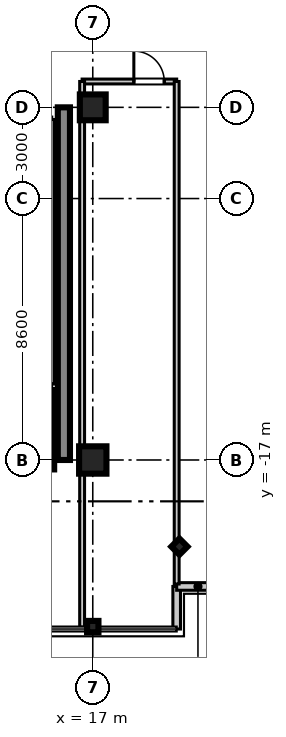
"""IFC4 building model, lengths in metres.
Left out: names, types, materials, properties, quantities, classifications, styles, units other than length and angle.
Written with IfcOpenShell. Run it as: python <this file> out.ifc"""

import sys

from ifc_helpers import new_model, si_unit, direction, frame, frame_2d, origin, origin_2d, place, context, subcontext, project, spatial, rectangle, i_section, extrude, source, transform, mapped, element, fill, save


model = new_model("IFC4")
c1 = context("Model", 3, precision=1e-05, world=origin(), true_north=direction((0.0, 1.0)))
c2 = subcontext(c1, "Body", "Model", "MODEL_VIEW")
j1 = project(units=[si_unit("LENGTHUNIT", "METRE"), si_unit("PLANEANGLEUNIT", "RADIAN")], contexts=[c1])
p1 = place(None, origin())
s1 = spatial("IfcSite", under=j1, at=p1, CompositionType="ELEMENT")
p2 = place(p1, origin())
s2 = spatial("IfcBuilding", under=s1, at=p2, CompositionType="ELEMENT")
p3 = place(p2, frame((0.0, 0.0, 273.8)))
s3 = spatial("IfcBuildingStorey", under=s2, at=p3, CompositionType="ELEMENT", Elevation=273.8)
m1 = source(origin(), c2, "Body", "SweptSolid", [
    extrude(rectangle(XDim=0.9, YDim=0.9, at=origin_2d()), origin(), (0.0, 0.0, 1.0), 3.705),
])
p4 = place(p3, frame((17.0, -17.0, 0.0), z_axis=(0.0, 0.0, 1.0), x_axis=(1.0, 0.0, 0.0)))
e1 = element("IfcColumn", 1, at=p4, inside=s3, PredefinedType="COLUMN", context=c2, shape_type="MappedRepresentation", body=[
    mapped(m1, transform((0.0, 0.0, 0.0), scale=1.0)),
])
m2 = source(origin(), c2, "Body", "SweptSolid", [
    extrude(rectangle(XDim=0.85, YDim=0.85, at=origin_2d()), origin(), (0.0, 0.0, 1.0), 3.705),
])
p5 = place(p3, frame((17.0, -5.4, 0.0), z_axis=(0.0, 0.0, 1.0), x_axis=(1.0, 0.0, 0.0)))
e2 = element("IfcColumn", 2, at=p5, inside=s3, PredefinedType="PILASTER", context=c2, shape_type="MappedRepresentation", body=[
    mapped(m2, transform((0.0, 0.0, 0.0), scale=1.0)),
])
m3 = source(origin(), c2, "Body", "SweptSolid", [
    extrude(i_section(OverallWidth=0.374, OverallDepth=0.374, WebThickness=0.014, FlangeThickness=0.023, at=origin_2d()), origin(), (0.0, 0.0, 1.0), 3.705),
])
for number, where, z_axis, x_axis in (
    (3, (17.0, -22.48, 0.0), (0.0, 0.0, 1.0), (0.0, 1.0, 0.0)),
    (4, (19.85, -19.85, 0.0), (0.0, 0.0, 1.0), (0.707, 0.707, 0.0)),
):
    element("IfcColumn", number, at=place(p3, frame(where, z_axis=z_axis, x_axis=x_axis)), inside=s3, PredefinedType="COLUMN", context=c2, shape_type="MappedRepresentation", body=[
        mapped(m3, transform((0.0, 0.0, 0.0), scale=1.0)),
    ])
m4 = source(origin(), c2, "Body", "SweptSolid", [
    extrude(rectangle(XDim=11.6, YDim=0.4, at=frame_2d((5.8, 0.0))), origin(), (0.0, 0.0, 1.0), 3.45),
])
p6 = place(p3, frame((16.05, -17.0, 0.0), z_axis=(0.0, 0.0, 1.0), x_axis=(0.0, 1.0, 0.0)))
e5 = element("IfcWall", 5, at=p6, inside=s3, PredefinedType="SHEAR", context=c2, shape_type="MappedRepresentation", body=[
    mapped(m4, transform((0.0, 0.0, 0.0), scale=1.0)),
])
m5 = source(origin(), c2, "Body", "SweptSolid", [
    extrude(rectangle(XDim=2.61, YDim=0.22, at=frame_2d((1.305, 0.0))), origin(), (0.0, 0.0, 1.0), 3.45),
])
p7 = place(p3, frame((15.62, -17.31, 0.0), z_axis=(0.0, 0.0, 1.0), x_axis=(0.0, 1.0, 0.0)))
e6 = element("IfcWall", 6, at=p7, inside=s3, PredefinedType="SHEAR", context=c2, shape_type="MappedRepresentation", body=[
    mapped(m5, transform((0.0, 0.0, 0.0), scale=1.0)),
])
m6 = source(origin(), c2, "Body", "SweptSolid", [
    extrude(rectangle(XDim=1.4, YDim=0.25, at=frame_2d((0.7, 0.0))), origin(), (0.0, 0.0, 1.0), 3.45),
])
p8 = place(p3, frame((19.76, -22.56, 0.0), z_axis=(0.0, 0.0, 1.0), x_axis=(0.0, 1.0, 0.0)))
e7 = element("IfcWall", 7, at=p8, inside=s3, PredefinedType="STANDARD", context=c2, shape_type="MappedRepresentation", body=[
    mapped(m6, transform((0.0, 0.0, 0.0), scale=1.0)),
])
m7 = source(origin(), c2, "Body", "SweptSolid", [
    extrude(rectangle(XDim=1.4, YDim=0.25, at=frame_2d((0.7, 0.0))), origin(), (0.0, 0.0, 1.0), 3.45),
])
p9 = place(p3, frame((19.76, -21.16, 0.0), z_axis=(0.0, 0.0, 1.0), x_axis=(1.0, 0.0, 0.0)))
e8 = element("IfcWall", 8, at=p9, inside=s3, PredefinedType="STANDARD", context=c2, shape_type="MappedRepresentation", body=[
    mapped(m7, transform((0.0, 0.0, 0.0), scale=1.0)),
])
m8 = source(origin(), c2, "Body", "SweptSolid", [
    extrude(rectangle(XDim=8.7, YDim=0.16, at=frame_2d((4.35, 0.0))), origin(), (0.0, 0.0, 1.0), 2.79),
])
p10 = place(p3, frame((15.65, -14.5, 0.0), z_axis=(0.0, 0.0, 1.0), x_axis=(0.0, 1.0, 0.0)))
e9 = element("IfcWall", 9, at=p10, inside=s3, PredefinedType="PARTITIONING", context=c2, shape_type="MappedRepresentation", body=[
    mapped(m8, transform((0.0, 0.0, 0.0), scale=1.0)),
])
m9 = source(origin(), c2, "Body", "SweptSolid", [
    extrude(rectangle(XDim=3.11, YDim=0.16, at=frame_2d((1.555, 0.0))), origin(), (0.0, 0.0, 1.0), 2.79),
])
p11 = place(p3, frame((16.65, -4.55, 0.0), z_axis=(0.0, 0.0, 1.0), x_axis=(1.0, 0.0, 0.0)))
e10 = element("IfcWall", 10, at=p11, inside=s3, PredefinedType="PARTITIONING", context=c2, shape_type="MappedRepresentation", body=[
    mapped(m9, transform((0.0, 0.0, 0.0), scale=1.0)),
])
p12 = place(p11, frame((1.701, 0.0, 0.0)))
e11 = element("IfcOpeningElement", 11, at=p12, cuts=e10, PredefinedType="OPENING", context=c2, shape_type="SweptSolid", body=[
    extrude(rectangle(XDim=1.0, YDim=2.1, at=frame_2d((0.5, 1.05))), frame((0.0, 0.09, 0.0), z_axis=(0.0, -1.0, 0.0), x_axis=(1.0, 0.0, 0.0)), (0.0, 0.0, 1.0), 0.18),
])
m10 = source(origin(), c2, "Body", "SweptSolid", [
    extrude(rectangle(XDim=17.95, YDim=0.16, at=frame_2d((8.975, 0.0))), origin(), (0.0, 0.0, 1.0), 2.79),
])
p13 = place(p3, frame((16.65, -22.5, 0.0), z_axis=(0.0, 0.0, 1.0), x_axis=(0.0, 1.0, 0.0)))
e12 = element("IfcWall", 12, at=p13, inside=s3, PredefinedType="PARTITIONING", context=c2, shape_type="MappedRepresentation", body=[
    mapped(m10, transform((0.0, 0.0, 0.0), scale=1.0)),
])
m11 = source(origin(), c2, "Body", "SweptSolid", [
    extrude(rectangle(XDim=16.53, YDim=0.16, at=frame_2d((8.265, 0.0))), origin(), (0.0, 0.0, 1.0), 2.79),
])
p14 = place(p3, frame((19.76, -21.08, 0.0), z_axis=(0.0, 0.0, 1.0), x_axis=(0.0, 1.0, 0.0)))
e13 = element("IfcWall", 13, at=p14, inside=s3, PredefinedType="PARTITIONING", context=c2, shape_type="MappedRepresentation", body=[
    mapped(m11, transform((0.0, 0.0, 0.0), scale=1.0)),
])
m12 = source(origin(), c2, "Body", "SweptSolid", [
    extrude(rectangle(XDim=1.0, YDim=2.1, at=frame_2d((0.5, 1.05))), frame((0.0, 0.025, 0.0), z_axis=(0.0, -1.0, 0.0), x_axis=(1.0, 0.0, 0.0)), (0.0, 0.0, 1.0), 0.05),
])
p15 = place(p12, frame((1.0, 0.0, 0.0), z_axis=(0.0, 0.0, 1.0), x_axis=(-1.0, 0.0, 0.0)))
e14 = element("IfcDoor", 14, at=p15, inside=s3, OperationType="SINGLE_SWING_LEFT", PredefinedType="DOOR", context=c2, shape_type="MappedRepresentation", body=[
    mapped(m12, transform((0.0, 0.0, 0.0), scale=1.0)),
])
fill(e11, e14)
save(model, sys.argv[1])
